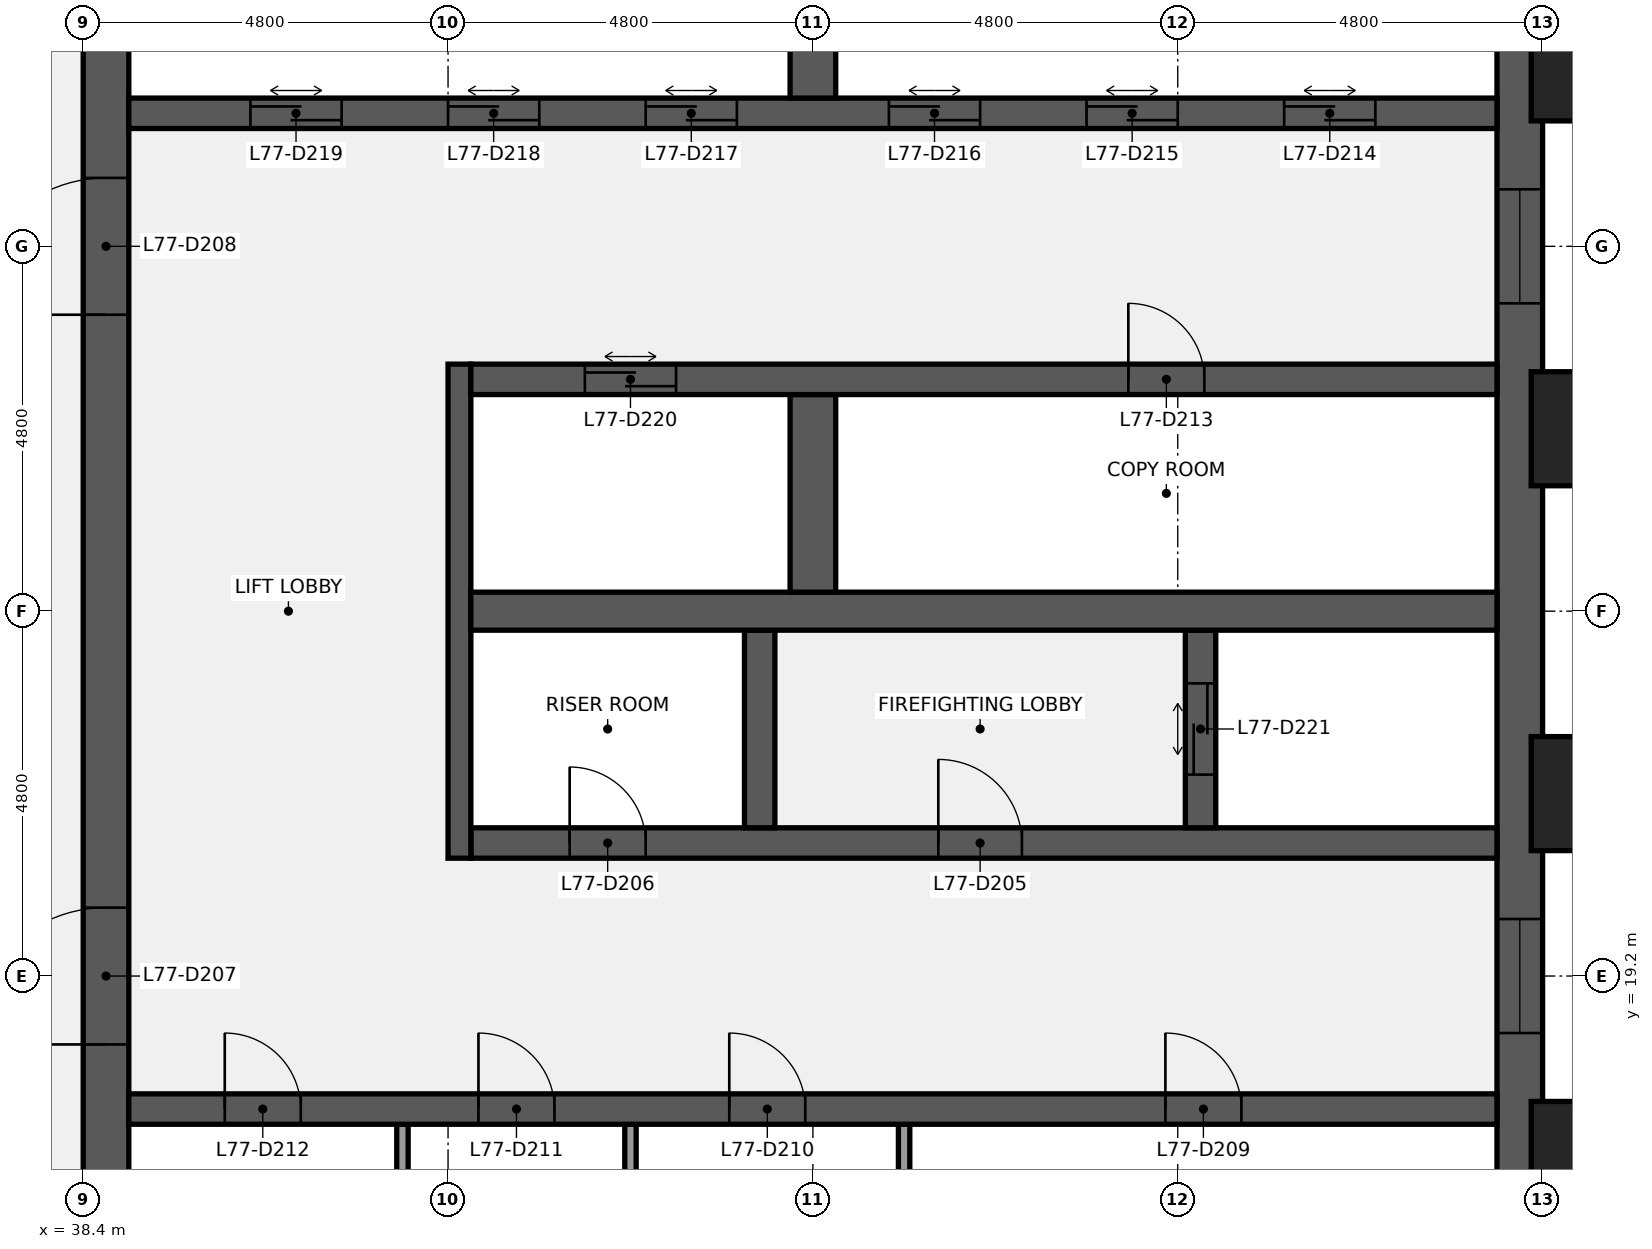
"""IFC4 building model, lengths in metres.
Left out: names, types, materials, properties, quantities, classifications, styles, units other than length and angle.
Written with IfcOpenShell. Run it as: python <this file> out.ifc"""

import sys

from ifc_helpers import new_model, si_unit, direction, frame, frame_2d, origin, origin_2d, place, context, subcontext, project, spatial, rectangle, extrude, element, fill, save


model = new_model("IFC4")
c1 = context("Model", 3, precision=1e-05, world=origin(), true_north=direction((0.0, 1.0)))
c2 = subcontext(c1, "Body", "Model", "MODEL_VIEW")
j1 = project(units=[si_unit("LENGTHUNIT", "METRE"), si_unit("PLANEANGLEUNIT", "RADIAN")], contexts=[c1])
p1 = place(None, origin())
s1 = spatial("IfcSite", under=j1, at=p1, CompositionType="ELEMENT")
p2 = place(p1, origin())
s2 = spatial("IfcBuilding", under=s1, at=p2, CompositionType="ELEMENT")
p3 = place(p2, frame((0.0, 0.0, 346.3)))
s3 = spatial("IfcBuildingStorey", under=s2, at=p3, CompositionType="ELEMENT", Elevation=346.3)
p4 = place(p3, frame((57.3, 38.4, 0.0), z_axis=(0.0, 0.0, 1.0), x_axis=(0.0, -1.0, 0.0)))
e1 = element("IfcWall", 1, at=p4, inside=s3, PredefinedType="SHEAR", context=c2, shape_type="SweptSolid", body=[
    extrude(rectangle(XDim=28.8, YDim=0.6, at=frame_2d((14.4, 0.0))), origin(), (0.0, 0.0, 1.0), 3.84),
])
p5 = place(p4, frame((18.45, 0.0, 0.9)))
e2 = element("IfcOpeningElement", 2, at=p5, cuts=e1, PredefinedType="OPENING", context=c2, shape_type="SweptSolid", body=[
    extrude(rectangle(XDim=1.5, YDim=1.5, at=frame_2d((0.75, 0.75))), frame((0.0, 0.31, 0.0), z_axis=(0.0, -1.0, 0.0), x_axis=(1.0, 0.0, 0.0)), (0.0, 0.0, 1.0), 0.62),
])
p6 = place(p4, frame((8.85, 0.0, 0.9)))
e3 = element("IfcOpeningElement", 3, at=p6, cuts=e1, PredefinedType="OPENING", context=c2, shape_type="SweptSolid", body=[
    extrude(rectangle(XDim=1.5, YDim=1.5, at=frame_2d((0.75, 0.75))), frame((0.0, 0.31, 0.0), z_axis=(0.0, -1.0, 0.0), x_axis=(1.0, 0.0, 0.0)), (0.0, 0.0, 1.0), 0.62),
])
p7 = place(p3, frame((38.7, 9.6, 0.0), z_axis=(0.0, 0.0, 1.0), x_axis=(0.0, 1.0, 0.0)))
e4 = element("IfcWall", 4, at=p7, inside=s3, PredefinedType="SHEAR", context=c2, shape_type="SweptSolid", body=[
    extrude(rectangle(XDim=28.8, YDim=0.6, at=frame_2d((14.4, 0.0))), origin(), (0.0, 0.0, 1.0), 3.84),
])
p8 = place(p7, frame((8.7, 0.0, 0.0)))
e5 = element("IfcOpeningElement", 5, at=p8, cuts=e4, PredefinedType="OPENING", context=c2, shape_type="SweptSolid", body=[
    extrude(rectangle(XDim=1.8, YDim=2.1, at=frame_2d((0.9, 1.05))), frame((0.0, 0.31, 0.0), z_axis=(0.0, -1.0, 0.0), x_axis=(1.0, 0.0, 0.0)), (0.0, 0.0, 1.0), 0.62),
])
p9 = place(p7, frame((18.3, 0.0, 0.0)))
e6 = element("IfcOpeningElement", 6, at=p9, cuts=e4, PredefinedType="OPENING", context=c2, shape_type="SweptSolid", body=[
    extrude(rectangle(XDim=1.8, YDim=2.1, at=frame_2d((0.9, 1.05))), frame((0.0, 0.31, 0.0), z_axis=(0.0, -1.0, 0.0), x_axis=(1.0, 0.0, 0.0)), (0.0, 0.0, 1.0), 0.62),
])
for number, where, z_axis, x_axis in (
    (7, (49.2, 14.65, 0.0), (0.0, 0.0, 1.0), (0.0, 1.0, 0.0)),
    (8, (45.6, 14.65, 0.0), (0.0, 0.0, 1.0), (0.0, 1.0, 0.0)),
    (9, (42.6, 14.65, 0.0), (0.0, 0.0, 1.0), (0.0, 1.0, 0.0)),
):
    element("IfcWall", number, at=place(p3, frame(where, z_axis=z_axis, x_axis=x_axis)), inside=s3, PredefinedType="PARTITIONING", context=c2, shape_type="SweptSolid", body=[
        extrude(rectangle(XDim=2.6, YDim=0.15, at=frame_2d((1.3, 0.0))), origin(), (0.0, 0.0, 1.0), 3.84),
    ])
p10 = place(p3, frame((39.0, 17.45, 0.0), z_axis=(0.0, 0.0, 1.0), x_axis=(1.0, 0.0, 0.0)))
e10 = element("IfcWall", 10, at=p10, inside=s3, PredefinedType="SHEAR", context=c2, shape_type="SweptSolid", body=[
    extrude(rectangle(XDim=18.0, YDim=0.4, at=frame_2d((9.0, 0.0))), origin(), (0.0, 0.0, 1.0), 3.84),
])
p11 = place(p10, frame((13.637, 0.0, 0.0)))
e11 = element("IfcOpeningElement", 11, at=p11, cuts=e10, PredefinedType="OPENING", context=c2, shape_type="SweptSolid", body=[
    extrude(rectangle(XDim=1.0, YDim=2.1, at=frame_2d((0.5, 1.05))), frame((0.0, 0.21, 0.0), z_axis=(0.0, -1.0, 0.0), x_axis=(1.0, 0.0, 0.0)), (0.0, 0.0, 1.0), 0.42),
])
p12 = place(p10, frame((7.9, 0.0, 0.0)))
e12 = element("IfcOpeningElement", 12, at=p12, cuts=e10, PredefinedType="OPENING", context=c2, shape_type="SweptSolid", body=[
    extrude(rectangle(XDim=1.0, YDim=2.1, at=frame_2d((0.5, 1.05))), frame((0.0, 0.21, 0.0), z_axis=(0.0, -1.0, 0.0), x_axis=(1.0, 0.0, 0.0)), (0.0, 0.0, 1.0), 0.42),
])
p13 = place(p10, frame((4.6, 0.0, 0.0)))
e13 = element("IfcOpeningElement", 13, at=p13, cuts=e10, PredefinedType="OPENING", context=c2, shape_type="SweptSolid", body=[
    extrude(rectangle(XDim=1.0, YDim=2.1, at=frame_2d((0.5, 1.05))), frame((0.0, 0.21, 0.0), z_axis=(0.0, -1.0, 0.0), x_axis=(1.0, 0.0, 0.0)), (0.0, 0.0, 1.0), 0.42),
])
p14 = place(p10, frame((1.262, 0.0, 0.0)))
e14 = element("IfcOpeningElement", 14, at=p14, cuts=e10, PredefinedType="OPENING", context=c2, shape_type="SweptSolid", body=[
    extrude(rectangle(XDim=1.0, YDim=2.1, at=frame_2d((0.5, 1.05))), frame((0.0, 0.21, 0.0), z_axis=(0.0, -1.0, 0.0), x_axis=(1.0, 0.0, 0.0)), (0.0, 0.0, 1.0), 0.42),
])
p15 = place(p3, frame((43.5, 20.95, 0.0), z_axis=(0.0, 0.0, 1.0), x_axis=(1.0, 0.0, 0.0)))
e15 = element("IfcWall", 15, at=p15, inside=s3, PredefinedType="SHEAR", context=c2, shape_type="SweptSolid", body=[
    extrude(rectangle(XDim=13.5, YDim=0.4, at=frame_2d((6.75, 0.0))), origin(), (0.0, 0.0, 1.0), 3.84),
])
p16 = place(p15, frame((6.15, 0.0, 0.0)))
e16 = element("IfcOpeningElement", 16, at=p16, cuts=e15, PredefinedType="OPENING", context=c2, shape_type="SweptSolid", body=[
    extrude(rectangle(XDim=1.1, YDim=2.1, at=frame_2d((0.55, 1.05))), frame((0.0, 0.21, 0.0), z_axis=(0.0, -1.0, 0.0), x_axis=(1.0, 0.0, 0.0)), (0.0, 0.0, 1.0), 0.42),
])
p17 = place(p15, frame((1.3, 0.0, 0.0)))
e17 = element("IfcOpeningElement", 17, at=p17, cuts=e15, PredefinedType="OPENING", context=c2, shape_type="SweptSolid", body=[
    extrude(rectangle(XDim=1.0, YDim=2.1, at=frame_2d((0.5, 1.05))), frame((0.0, 0.21, 0.0), z_axis=(0.0, -1.0, 0.0), x_axis=(1.0, 0.0, 0.0)), (0.0, 0.0, 1.0), 0.42),
])
p18 = place(p3, frame((43.35, 20.75, 0.0), z_axis=(0.0, 0.0, 1.0), x_axis=(0.0, 1.0, 0.0)))
e18 = element("IfcWall", 18, at=p18, inside=s3, PredefinedType="SHEAR", context=c2, shape_type="SweptSolid", body=[
    extrude(rectangle(XDim=6.5, YDim=0.3, at=frame_2d((3.25, 0.0))), origin(), (0.0, 0.0, 1.0), 3.84),
])
p19 = place(p3, frame((53.1, 21.15, 0.0), z_axis=(0.0, 0.0, 1.0), x_axis=(0.0, 1.0, 0.0)))
e19 = element("IfcWall", 19, at=p19, inside=s3, PredefinedType="SHEAR", context=c2, shape_type="SweptSolid", body=[
    extrude(rectangle(XDim=2.6, YDim=0.4, at=frame_2d((1.3, 0.0))), origin(), (0.0, 0.0, 1.0), 3.84),
])
p20 = place(p19, frame((0.7, 0.0, 0.0)))
e20 = element("IfcOpeningElement", 20, at=p20, cuts=e19, PredefinedType="OPENING", context=c2, shape_type="SweptSolid", body=[
    extrude(rectangle(XDim=1.2, YDim=2.1, at=frame_2d((0.6, 1.05))), frame((0.0, 0.21, 0.0), z_axis=(0.0, -1.0, 0.0), x_axis=(1.0, 0.0, 0.0)), (0.0, 0.0, 1.0), 0.42),
])
p21 = place(p3, frame((47.3, 21.15, 0.0), z_axis=(0.0, 0.0, 1.0), x_axis=(0.0, 1.0, 0.0)))
e21 = element("IfcWall", 21, at=p21, inside=s3, PredefinedType="SHEAR", context=c2, shape_type="SweptSolid", body=[
    extrude(rectangle(XDim=2.6, YDim=0.4, at=frame_2d((1.3, 0.0))), origin(), (0.0, 0.0, 1.0), 3.84),
])
p22 = place(p3, frame((43.5, 24.0, 0.0), z_axis=(0.0, 0.0, 1.0), x_axis=(1.0, 0.0, 0.0)))
e22 = element("IfcWall", 22, at=p22, inside=s3, PredefinedType="SHEAR", context=c2, shape_type="SweptSolid", body=[
    extrude(rectangle(XDim=13.5, YDim=0.5, at=frame_2d((6.75, 0.0))), origin(), (0.0, 0.0, 1.0), 3.84),
])
p23 = place(p3, frame((48.0, 24.25, 0.0), z_axis=(0.0, 0.0, 1.0), x_axis=(0.0, 1.0, 0.0)))
e23 = element("IfcWall", 23, at=p23, inside=s3, PredefinedType="SHEAR", context=c2, shape_type="SweptSolid", body=[
    extrude(rectangle(XDim=2.6, YDim=0.6, at=frame_2d((1.3, 0.0))), origin(), (0.0, 0.0, 1.0), 3.84),
])
p24 = place(p3, frame((43.5, 27.05, 0.0), z_axis=(0.0, 0.0, 1.0), x_axis=(1.0, 0.0, 0.0)))
e24 = element("IfcWall", 24, at=p24, inside=s3, PredefinedType="SHEAR", context=c2, shape_type="SweptSolid", body=[
    extrude(rectangle(XDim=13.5, YDim=0.4, at=frame_2d((6.75, 0.0))), origin(), (0.0, 0.0, 1.0), 3.84),
])
p25 = place(p24, frame((8.65, 0.0, 0.0)))
e25 = element("IfcOpeningElement", 25, at=p25, cuts=e24, PredefinedType="OPENING", context=c2, shape_type="SweptSolid", body=[
    extrude(rectangle(XDim=1.0, YDim=2.1, at=frame_2d((0.5, 1.05))), frame((0.0, 0.21, 0.0), z_axis=(0.0, -1.0, 0.0), x_axis=(1.0, 0.0, 0.0)), (0.0, 0.0, 1.0), 0.42),
])
p26 = place(p24, frame((1.5, 0.0, 0.0)))
e26 = element("IfcOpeningElement", 26, at=p26, cuts=e24, PredefinedType="OPENING", context=c2, shape_type="SweptSolid", body=[
    extrude(rectangle(XDim=1.2, YDim=2.1, at=frame_2d((0.6, 1.05))), frame((0.0, 0.21, 0.0), z_axis=(0.0, -1.0, 0.0), x_axis=(1.0, 0.0, 0.0)), (0.0, 0.0, 1.0), 0.42),
])
p27 = place(p3, frame((39.0, 30.55, 0.0), z_axis=(0.0, 0.0, 1.0), x_axis=(1.0, 0.0, 0.0)))
e27 = element("IfcWall", 27, at=p27, inside=s3, PredefinedType="SHEAR", context=c2, shape_type="SweptSolid", body=[
    extrude(rectangle(XDim=18.0, YDim=0.4, at=frame_2d((9.0, 0.0))), origin(), (0.0, 0.0, 1.0), 3.84),
])
p28 = place(p27, frame((15.2, 0.0, 0.0)))
e28 = element("IfcOpeningElement", 28, at=p28, cuts=e27, PredefinedType="OPENING", context=c2, shape_type="SweptSolid", body=[
    extrude(rectangle(XDim=1.2, YDim=2.1, at=frame_2d((0.6, 1.05))), frame((0.0, 0.21, 0.0), z_axis=(0.0, -1.0, 0.0), x_axis=(1.0, 0.0, 0.0)), (0.0, 0.0, 1.0), 0.42),
])
p29 = place(p27, frame((12.6, 0.0, 0.0)))
e29 = element("IfcOpeningElement", 29, at=p29, cuts=e27, PredefinedType="OPENING", context=c2, shape_type="SweptSolid", body=[
    extrude(rectangle(XDim=1.2, YDim=2.1, at=frame_2d((0.6, 1.05))), frame((0.0, 0.21, 0.0), z_axis=(0.0, -1.0, 0.0), x_axis=(1.0, 0.0, 0.0)), (0.0, 0.0, 1.0), 0.42),
])
p30 = place(p27, frame((10.0, 0.0, 0.0)))
e30 = element("IfcOpeningElement", 30, at=p30, cuts=e27, PredefinedType="OPENING", context=c2, shape_type="SweptSolid", body=[
    extrude(rectangle(XDim=1.2, YDim=2.1, at=frame_2d((0.6, 1.05))), frame((0.0, 0.21, 0.0), z_axis=(0.0, -1.0, 0.0), x_axis=(1.0, 0.0, 0.0)), (0.0, 0.0, 1.0), 0.42),
])
p31 = place(p27, frame((6.8, 0.0, 0.0)))
e31 = element("IfcOpeningElement", 31, at=p31, cuts=e27, PredefinedType="OPENING", context=c2, shape_type="SweptSolid", body=[
    extrude(rectangle(XDim=1.2, YDim=2.1, at=frame_2d((0.6, 1.05))), frame((0.0, 0.21, 0.0), z_axis=(0.0, -1.0, 0.0), x_axis=(1.0, 0.0, 0.0)), (0.0, 0.0, 1.0), 0.42),
])
p32 = place(p27, frame((4.2, 0.0, 0.0)))
e32 = element("IfcOpeningElement", 32, at=p32, cuts=e27, PredefinedType="OPENING", context=c2, shape_type="SweptSolid", body=[
    extrude(rectangle(XDim=1.2, YDim=2.1, at=frame_2d((0.6, 1.05))), frame((0.0, 0.21, 0.0), z_axis=(0.0, -1.0, 0.0), x_axis=(1.0, 0.0, 0.0)), (0.0, 0.0, 1.0), 0.42),
])
p33 = place(p27, frame((1.6, 0.0, 0.0)))
e33 = element("IfcOpeningElement", 33, at=p33, cuts=e27, PredefinedType="OPENING", context=c2, shape_type="SweptSolid", body=[
    extrude(rectangle(XDim=1.2, YDim=2.1, at=frame_2d((0.6, 1.05))), frame((0.0, 0.21, 0.0), z_axis=(0.0, -1.0, 0.0), x_axis=(1.0, 0.0, 0.0)), (0.0, 0.0, 1.0), 0.42),
])
p34 = place(p3, frame((48.0, 30.75, 0.0), z_axis=(0.0, 0.0, 1.0), x_axis=(0.0, 1.0, 0.0)))
e34 = element("IfcWall", 34, at=p34, inside=s3, PredefinedType="SHEAR", context=c2, shape_type="SweptSolid", body=[
    extrude(rectangle(XDim=2.6, YDim=0.6, at=frame_2d((1.3, 0.0))), origin(), (0.0, 0.0, 1.0), 3.84),
])
for number, where, z_axis, x_axis in (
    (35, (58.35, 16.8, 0.0), (0.0, 0.0, 1.0), (0.0, 1.0, 0.0)),
    (36, (58.35, 21.6, 0.0), (0.0, 0.0, 1.0), (0.0, 1.0, 0.0)),
    (37, (58.35, 26.4, 0.0), (0.0, 0.0, 1.0), (0.0, 1.0, 0.0)),
    (38, (58.35, 31.2, 0.0), (0.0, 0.0, 1.0), (0.0, 1.0, 0.0)),
):
    element("IfcColumn", number, at=place(p3, frame(where, z_axis=z_axis, x_axis=x_axis)), inside=s3, PredefinedType="PILASTER", context=c2, shape_type="SweptSolid", body=[
        extrude(rectangle(XDim=1.8, YDim=1.5, at=origin_2d()), origin(), (0.0, 0.0, 1.0), 4.0),
    ])
p35 = place(p16, origin())
e39 = element("IfcDoor", 39, at=p35, inside=s3, OperationType="SINGLE_SWING_LEFT", PredefinedType="DOOR", context=c2, shape_type="SweptSolid", body=[
    extrude(rectangle(XDim=1.1, YDim=2.1, at=frame_2d((0.55, 1.05))), frame((0.0, 0.025, 0.0), z_axis=(0.0, -1.0, 0.0), x_axis=(1.0, 0.0, 0.0)), (0.0, 0.0, 1.0), 0.05),
])
fill(e16, e39)
p36 = place(p17, origin())
e40 = element("IfcDoor", 40, at=p36, inside=s3, OperationType="SINGLE_SWING_LEFT", PredefinedType="DOOR", context=c2, shape_type="SweptSolid", body=[
    extrude(rectangle(XDim=1.0, YDim=2.1, at=frame_2d((0.5, 1.05))), frame((0.0, 0.025, 0.0), z_axis=(0.0, -1.0, 0.0), x_axis=(1.0, 0.0, 0.0)), (0.0, 0.0, 1.0), 0.05),
])
fill(e17, e40)
p37 = place(p8, origin())
e41 = element("IfcDoor", 41, at=p37, inside=s3, OperationType="DOUBLE_DOOR_SINGLE_SWING", PredefinedType="DOOR", context=c2, shape_type="SweptSolid", body=[
    extrude(rectangle(XDim=1.8, YDim=2.1, at=frame_2d((0.9, 1.05))), frame((0.0, 0.025, 0.0), z_axis=(0.0, -1.0, 0.0), x_axis=(1.0, 0.0, 0.0)), (0.0, 0.0, 1.0), 0.05),
])
fill(e5, e41)
p38 = place(p9, origin())
e42 = element("IfcDoor", 42, at=p38, inside=s3, OperationType="DOUBLE_DOOR_SINGLE_SWING", PredefinedType="DOOR", context=c2, shape_type="SweptSolid", body=[
    extrude(rectangle(XDim=1.8, YDim=2.1, at=frame_2d((0.9, 1.05))), frame((0.0, 0.025, 0.0), z_axis=(0.0, -1.0, 0.0), x_axis=(1.0, 0.0, 0.0)), (0.0, 0.0, 1.0), 0.05),
])
fill(e6, e42)
p39 = place(p11, origin())
e43 = element("IfcDoor", 43, at=p39, inside=s3, OperationType="SINGLE_SWING_LEFT", PredefinedType="DOOR", context=c2, shape_type="SweptSolid", body=[
    extrude(rectangle(XDim=1.0, YDim=2.1, at=frame_2d((0.5, 1.05))), frame((0.0, 0.025, 0.0), z_axis=(0.0, -1.0, 0.0), x_axis=(1.0, 0.0, 0.0)), (0.0, 0.0, 1.0), 0.05),
])
fill(e11, e43)
p40 = place(p12, origin())
e44 = element("IfcDoor", 44, at=p40, inside=s3, OperationType="SINGLE_SWING_LEFT", PredefinedType="DOOR", context=c2, shape_type="SweptSolid", body=[
    extrude(rectangle(XDim=1.0, YDim=2.1, at=frame_2d((0.5, 1.05))), frame((0.0, 0.025, 0.0), z_axis=(0.0, -1.0, 0.0), x_axis=(1.0, 0.0, 0.0)), (0.0, 0.0, 1.0), 0.05),
])
fill(e12, e44)
p41 = place(p13, origin())
e45 = element("IfcDoor", 45, at=p41, inside=s3, OperationType="SINGLE_SWING_LEFT", PredefinedType="DOOR", context=c2, shape_type="SweptSolid", body=[
    extrude(rectangle(XDim=1.0, YDim=2.1, at=frame_2d((0.5, 1.05))), frame((0.0, 0.025, 0.0), z_axis=(0.0, -1.0, 0.0), x_axis=(1.0, 0.0, 0.0)), (0.0, 0.0, 1.0), 0.05),
])
fill(e13, e45)
p42 = place(p14, origin())
e46 = element("IfcDoor", 46, at=p42, inside=s3, OperationType="SINGLE_SWING_LEFT", PredefinedType="DOOR", context=c2, shape_type="SweptSolid", body=[
    extrude(rectangle(XDim=1.0, YDim=2.1, at=frame_2d((0.5, 1.05))), frame((0.0, 0.025, 0.0), z_axis=(0.0, -1.0, 0.0), x_axis=(1.0, 0.0, 0.0)), (0.0, 0.0, 1.0), 0.05),
])
fill(e14, e46)
p43 = place(p25, origin())
e47 = element("IfcDoor", 47, at=p43, inside=s3, OperationType="SINGLE_SWING_LEFT", PredefinedType="DOOR", context=c2, shape_type="SweptSolid", body=[
    extrude(rectangle(XDim=1.0, YDim=2.1, at=frame_2d((0.5, 1.05))), frame((0.0, 0.025, 0.0), z_axis=(0.0, -1.0, 0.0), x_axis=(1.0, 0.0, 0.0)), (0.0, 0.0, 1.0), 0.05),
])
fill(e25, e47)
p44 = place(p28, origin())
e48 = element("IfcDoor", 48, at=p44, inside=s3, OperationType="DOUBLE_DOOR_SLIDING", PredefinedType="DOOR", context=c2, shape_type="SweptSolid", body=[
    extrude(rectangle(XDim=1.2, YDim=2.1, at=frame_2d((0.6, 1.05))), frame((0.0, 0.025, 0.0), z_axis=(0.0, -1.0, 0.0), x_axis=(1.0, 0.0, 0.0)), (0.0, 0.0, 1.0), 0.05),
])
fill(e28, e48)
p45 = place(p29, origin())
e49 = element("IfcDoor", 49, at=p45, inside=s3, OperationType="DOUBLE_DOOR_SLIDING", PredefinedType="DOOR", context=c2, shape_type="SweptSolid", body=[
    extrude(rectangle(XDim=1.2, YDim=2.1, at=frame_2d((0.6, 1.05))), frame((0.0, 0.025, 0.0), z_axis=(0.0, -1.0, 0.0), x_axis=(1.0, 0.0, 0.0)), (0.0, 0.0, 1.0), 0.05),
])
fill(e29, e49)
p46 = place(p30, origin())
e50 = element("IfcDoor", 50, at=p46, inside=s3, OperationType="DOUBLE_DOOR_SLIDING", PredefinedType="DOOR", context=c2, shape_type="SweptSolid", body=[
    extrude(rectangle(XDim=1.2, YDim=2.1, at=frame_2d((0.6, 1.05))), frame((0.0, 0.025, 0.0), z_axis=(0.0, -1.0, 0.0), x_axis=(1.0, 0.0, 0.0)), (0.0, 0.0, 1.0), 0.05),
])
fill(e30, e50)
p47 = place(p31, origin())
e51 = element("IfcDoor", 51, at=p47, inside=s3, OperationType="DOUBLE_DOOR_SLIDING", PredefinedType="DOOR", context=c2, shape_type="SweptSolid", body=[
    extrude(rectangle(XDim=1.2, YDim=2.1, at=frame_2d((0.6, 1.05))), frame((0.0, 0.025, 0.0), z_axis=(0.0, -1.0, 0.0), x_axis=(1.0, 0.0, 0.0)), (0.0, 0.0, 1.0), 0.05),
])
fill(e31, e51)
p48 = place(p32, origin())
e52 = element("IfcDoor", 52, at=p48, inside=s3, OperationType="DOUBLE_DOOR_SLIDING", PredefinedType="DOOR", context=c2, shape_type="SweptSolid", body=[
    extrude(rectangle(XDim=1.2, YDim=2.1, at=frame_2d((0.6, 1.05))), frame((0.0, 0.025, 0.0), z_axis=(0.0, -1.0, 0.0), x_axis=(1.0, 0.0, 0.0)), (0.0, 0.0, 1.0), 0.05),
])
fill(e32, e52)
p49 = place(p33, origin())
e53 = element("IfcDoor", 53, at=p49, inside=s3, OperationType="DOUBLE_DOOR_SLIDING", PredefinedType="DOOR", context=c2, shape_type="SweptSolid", body=[
    extrude(rectangle(XDim=1.2, YDim=2.1, at=frame_2d((0.6, 1.05))), frame((0.0, 0.025, 0.0), z_axis=(0.0, -1.0, 0.0), x_axis=(1.0, 0.0, 0.0)), (0.0, 0.0, 1.0), 0.05),
])
fill(e33, e53)
p50 = place(p26, origin())
e54 = element("IfcDoor", 54, at=p50, inside=s3, OperationType="DOUBLE_DOOR_SLIDING", PredefinedType="DOOR", context=c2, shape_type="SweptSolid", body=[
    extrude(rectangle(XDim=1.2, YDim=2.1, at=frame_2d((0.6, 1.05))), frame((0.0, 0.025, 0.0), z_axis=(0.0, -1.0, 0.0), x_axis=(1.0, 0.0, 0.0)), (0.0, 0.0, 1.0), 0.05),
])
fill(e26, e54)
p51 = place(p20, origin())
e55 = element("IfcDoor", 55, at=p51, inside=s3, OperationType="DOUBLE_DOOR_SLIDING", PredefinedType="DOOR", context=c2, shape_type="SweptSolid", body=[
    extrude(rectangle(XDim=1.2, YDim=2.1, at=frame_2d((0.6, 1.05))), frame((0.0, 0.025, 0.0), z_axis=(0.0, -1.0, 0.0), x_axis=(1.0, 0.0, 0.0)), (0.0, 0.0, 1.0), 0.05),
])
fill(e20, e55)
p52 = place(p5, origin())
e56 = element("IfcWindow", 56, at=p52, inside=s3, PartitioningType="SINGLE_PANEL", PredefinedType="WINDOW", context=c2, shape_type="SweptSolid", body=[
    extrude(rectangle(XDim=1.5, YDim=1.5, at=frame_2d((0.75, 0.75))), frame((0.0, 0.03, 0.0), z_axis=(0.0, -1.0, 0.0), x_axis=(1.0, 0.0, 0.0)), (0.0, 0.0, 1.0), 0.06),
])
fill(e2, e56)
p53 = place(p6, origin())
e57 = element("IfcWindow", 57, at=p53, inside=s3, PartitioningType="SINGLE_PANEL", PredefinedType="WINDOW", context=c2, shape_type="SweptSolid", body=[
    extrude(rectangle(XDim=1.5, YDim=1.5, at=frame_2d((0.75, 0.75))), frame((0.0, 0.03, 0.0), z_axis=(0.0, -1.0, 0.0), x_axis=(1.0, 0.0, 0.0)), (0.0, 0.0, 1.0), 0.06),
])
fill(e3, e57)
save(model, sys.argv[1])
